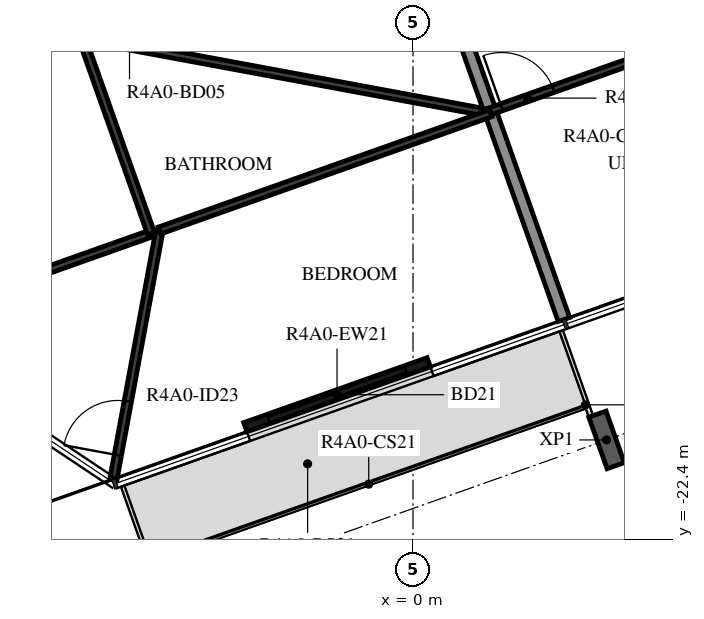
"""IFC4 building model, lengths in metres.
Left out: names, types, materials, properties, quantities, classifications, styles, units other than length and angle.
Written with IfcOpenShell. Run it as: python <this file> out.ifc"""

import sys

from ifc_helpers import new_model, si_unit, direction, frame, frame_2d, origin, origin_2d, place, context, subcontext, project, spatial, rectangle, i_section, extrude, element, fill, save


model = new_model("IFC4")
c1 = context("Model", 3, precision=1e-05, world=origin(), true_north=direction((0.0, 1.0)))
c2 = subcontext(c1, "Body", "Model", "MODEL_VIEW")
j1 = project(units=[si_unit("LENGTHUNIT", "METRE"), si_unit("PLANEANGLEUNIT", "RADIAN")], contexts=[c1])
p1 = place(None, origin())
s1 = spatial("IfcSite", under=j1, at=p1, CompositionType="ELEMENT")
p2 = place(p1, origin())
s2 = spatial("IfcBuilding", under=s1, at=p2, CompositionType="ELEMENT")
p3 = place(p2, frame((0.0, 0.0, 158.7)))
s3 = spatial("IfcBuildingStorey", under=s2, at=p3, CompositionType="ELEMENT", Elevation=158.7)
p4 = place(p3, frame((3.183, -20.761, -0.38), z_axis=(0.0, 0.0, 1.0), x_axis=(-0.942641392079, -0.333807138839, 0.0)))
e1 = element("IfcColumn", 1, at=p4, inside=s3, PredefinedType="COLUMN", context=c2, shape_type="SweptSolid", body=[
    extrude(i_section(OverallWidth=0.3, OverallDepth=0.9, WebThickness=0.019, FlangeThickness=0.035, FilletRadius=0.03, at=origin_2d()), origin(), (0.0, 0.0, 1.0), 3.5),
])
p5 = place(p3, frame((-2.758, -20.552, 0.0), z_axis=(0.0, 0.0, 1.0), x_axis=(0.94265323131, 0.333773704029, 0.0)))
e2 = element("IfcWall", 2, at=p5, inside=s3, PredefinedType="STANDARD", context=c2, shape_type="SweptSolid", body=[
    extrude(rectangle(XDim=3.2, YDim=0.16, at=frame_2d((1.6, 0.0))), origin(), (0.0, 0.0, 1.0), 3.12),
])
p6 = place(p5, frame((0.4, 0.0, 0.0)))
e3 = element("IfcOpeningElement", 3, at=p6, cuts=e2, PredefinedType="OPENING", context=c2, shape_type="SweptSolid", body=[
    extrude(rectangle(XDim=2.4, YDim=2.4, at=frame_2d((1.2, 1.2))), frame((0.0, 0.09, 0.0), z_axis=(0.0, -1.0, 0.0), x_axis=(1.0, 0.0, 0.0)), (0.0, 0.0, 1.0), 0.18),
])
p7 = place(p3, frame((2.482, -18.782, 0.0), z_axis=(0.0, 0.0, 1.0), x_axis=(-0.333807281402, 0.942641341594, 0.0)))
e4 = element("IfcWall", 4, at=p7, inside=s3, PredefinedType="STANDARD", context=c2, shape_type="SweptSolid", body=[
    extrude(rectangle(XDim=5.329, YDim=0.2, at=frame_2d((2.665, 0.0))), origin(), (0.0, 0.0, 1.0), 2.73),
])
p8 = place(p3, frame((-6.641, -13.923, 0.0), z_axis=(0.0, 0.0, 1.0), x_axis=(0.983250157272, -0.182261153912, 0.0)))
e5 = element("IfcWall", 5, at=p8, inside=s3, PredefinedType="PARTITIONING", context=c2, shape_type="SweptSolid", body=[
    extrude(rectangle(XDim=7.985, YDim=0.12, at=frame_2d((3.992, 0.0))), origin(), (0.0, 0.0, 1.0), 3.12),
])
p9 = place(p8, frame((1.612, 0.0, 0.0)))
e6 = element("IfcOpeningElement", 6, at=p9, cuts=e5, PredefinedType="OPENING", context=c2, shape_type="SweptSolid", body=[
    extrude(rectangle(XDim=0.8, YDim=2.1, at=frame_2d((0.4, 1.05))), frame((0.0, 0.07, 0.0), z_axis=(0.0, -1.0, 0.0), x_axis=(1.0, 0.0, 0.0)), (0.0, 0.0, 1.0), 0.14),
])
p10 = place(p3, frame((-12.015, -20.096, 0.0), z_axis=(0.0, 0.0, 1.0), x_axis=(0.942638718556, 0.333814688531, 0.0)))
e7 = element("IfcWall", 7, at=p10, inside=s3, PredefinedType="PARTITIONING", context=c2, shape_type="SweptSolid", body=[
    extrude(rectangle(XDim=8.216, YDim=0.12, at=frame_2d((4.108, 0.0))), origin(), (0.0, 0.0, 1.0), 3.12),
])
p11 = place(p10, frame((2.809, 0.0, 0.0)))
e8 = element("IfcOpeningElement", 8, at=p11, cuts=e7, PredefinedType="OPENING", context=c2, shape_type="SweptSolid", body=[
    extrude(rectangle(XDim=0.9, YDim=2.1, at=frame_2d((0.45, 1.05))), frame((0.0, 0.07, 0.0), z_axis=(0.0, -1.0, 0.0), x_axis=(1.0, 0.0, 0.0)), (0.0, 0.0, 1.0), 0.14),
])
p12 = place(p10, frame((0.2, 0.0, 0.0)))
e9 = element("IfcOpeningElement", 9, at=p12, cuts=e7, PredefinedType="OPENING", context=c2, shape_type="SweptSolid", body=[
    extrude(rectangle(XDim=0.9, YDim=2.1, at=frame_2d((0.45, 1.05))), frame((0.0, 0.07, 0.0), z_axis=(0.0, -1.0, 0.0), x_axis=(1.0, 0.0, 0.0)), (0.0, 0.0, 1.0), 0.14),
])
p13 = place(p3, frame((-4.308, -17.367, 0.0), z_axis=(0.0, 0.0, 1.0), x_axis=(-0.333802202677, 0.942643140052, 0.0)))
e10 = element("IfcWall", 10, at=p13, inside=s3, PredefinedType="PARTITIONING", context=c2, shape_type="SweptSolid", body=[
    extrude(rectangle(XDim=3.419, YDim=0.12, at=frame_2d((1.709, 0.0))), origin(), (0.0, 0.0, 1.0), 3.12),
])
p14 = place(p3, frame((-4.927, -21.406, 0.0), z_axis=(0.0, 0.0, 1.0), x_axis=(0.182238575099, 0.983254342348, 0.0)))
e11 = element("IfcWall", 11, at=p14, inside=s3, PredefinedType="PARTITIONING", context=c2, shape_type="SweptSolid", body=[
    extrude(rectangle(XDim=4.157, YDim=0.12, at=frame_2d((2.079, 0.0))), origin(), (0.0, 0.0, 1.0), 3.12),
])
p15 = place(p14, frame((0.4, 0.0, 0.0)))
e12 = element("IfcOpeningElement", 12, at=p15, cuts=e11, PredefinedType="OPENING", context=c2, shape_type="SweptSolid", body=[
    extrude(rectangle(XDim=0.9, YDim=2.1, at=frame_2d((0.45, 1.05))), frame((0.0, 0.07, 0.0), z_axis=(0.0, -1.0, 0.0), x_axis=(1.0, 0.0, 0.0)), (0.0, 0.0, 1.0), 0.14),
])
p16 = place(p3, frame((-4.17, -17.318, 0.0), z_axis=(0.0, 0.0, 1.0), x_axis=(0.942641343532, 0.333807275931, 0.0)))
e13 = element("IfcWall", 13, at=p16, inside=s3, PredefinedType="PARTITIONING", context=c2, shape_type="SweptSolid", body=[
    extrude(rectangle(XDim=5.781, YDim=0.12, at=frame_2d((2.891, 0.0))), origin(), (0.0, 0.0, 1.0), 3.12),
])
p17 = place(p3, frame((1.269, -15.357, 0.0), z_axis=(0.0, 0.0, 1.0), x_axis=(0.942639442898, 0.333812643101, 0.0)))
e14 = element("IfcWall", 14, at=p17, inside=s3, PredefinedType="PARTITIONING", context=c2, shape_type="SweptSolid", body=[
    extrude(rectangle(XDim=7.86, YDim=0.12, at=frame_2d((3.93, 0.0))), origin(), (0.0, 0.0, 1.0), 3.12),
])
p18 = place(p17, frame((0.2, 0.0, 0.0)))
e15 = element("IfcOpeningElement", 15, at=p18, cuts=e14, PredefinedType="OPENING", context=c2, shape_type="SweptSolid", body=[
    extrude(rectangle(XDim=0.9, YDim=2.1, at=frame_2d((0.45, 1.05))), frame((0.0, 0.07, 0.0), z_axis=(0.0, -1.0, 0.0), x_axis=(1.0, 0.0, 0.0)), (0.0, 0.0, 1.0), 0.14),
])
p19 = place(p6, origin())
e16 = element("IfcDoor", 16, at=p19, inside=s3, OperationType="DOUBLE_DOOR_SLIDING", PredefinedType="DOOR", context=c2, shape_type="SweptSolid", body=[
    extrude(rectangle(XDim=2.4, YDim=2.4, at=frame_2d((1.2, 1.2))), frame((0.0, 0.025, 0.0), z_axis=(0.0, -1.0, 0.0), x_axis=(1.0, 0.0, 0.0)), (0.0, 0.0, 1.0), 0.05),
])
fill(e3, e16)
p20 = place(p15, origin())
e17 = element("IfcDoor", 17, at=p20, inside=s3, OperationType="SINGLE_SWING_RIGHT", PredefinedType="DOOR", context=c2, shape_type="SweptSolid", body=[
    extrude(rectangle(XDim=0.9, YDim=2.1, at=frame_2d((0.45, 1.05))), frame((0.0, 0.025, 0.0), z_axis=(0.0, -1.0, 0.0), x_axis=(1.0, 0.0, 0.0)), (0.0, 0.0, 1.0), 0.05),
])
fill(e12, e17)
p21 = place(p18, origin())
e18 = element("IfcDoor", 18, at=p21, inside=s3, OperationType="SINGLE_SWING_LEFT", PredefinedType="DOOR", context=c2, shape_type="SweptSolid", body=[
    extrude(rectangle(XDim=0.9, YDim=2.1, at=frame_2d((0.45, 1.05))), frame((0.0, 0.025, 0.0), z_axis=(0.0, -1.0, 0.0), x_axis=(1.0, 0.0, 0.0)), (0.0, 0.0, 1.0), 0.05),
])
fill(e15, e18)
save(model, sys.argv[1])
